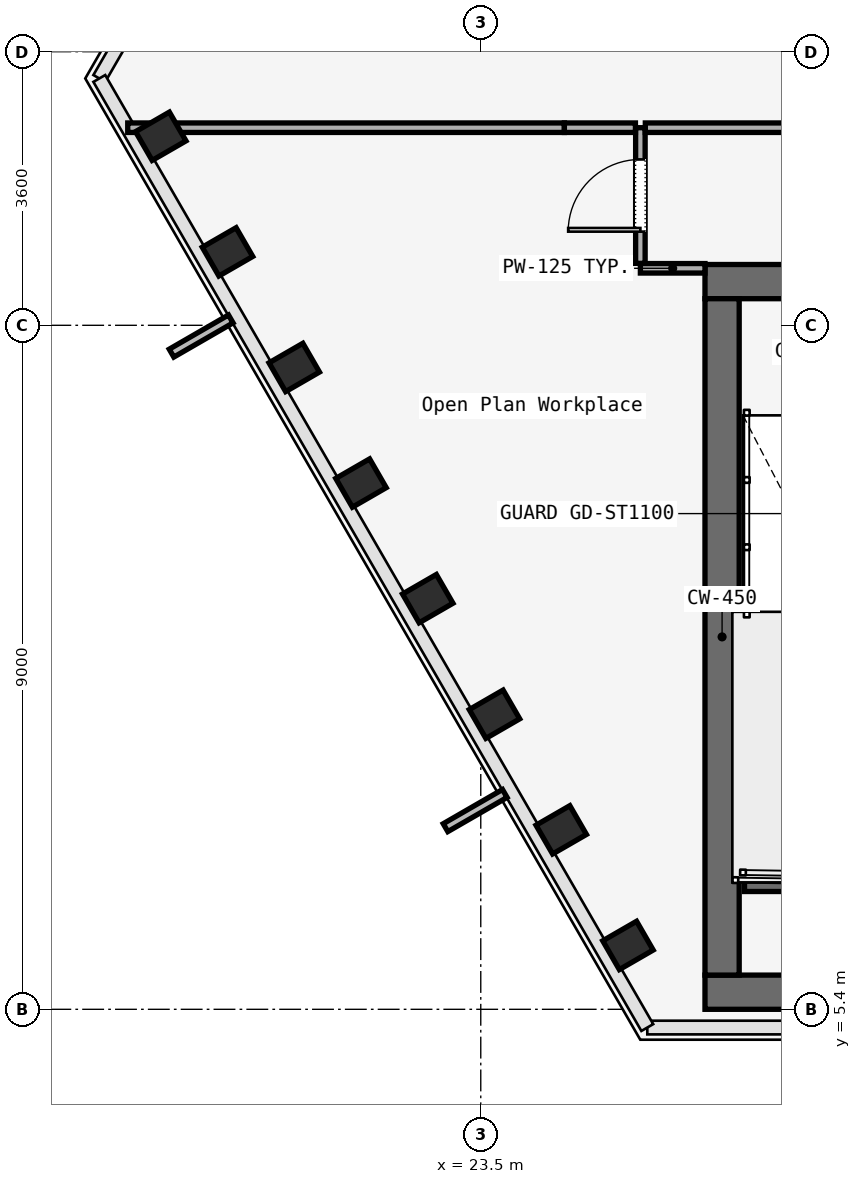
"""IFC4 building model, lengths in metres.
Left out: names, types, materials, properties, quantities, classifications, styles, units other than length and angle.
Written with IfcOpenShell. Run it as: python <this file> out.ifc"""

import sys

from ifc_helpers import new_model, si_unit, direction, frame, frame_2d, origin, origin_2d, place, context, subcontext, project, spatial, rectangle, i_section, extrude, element, fill, save


model = new_model("IFC4")
c1 = context("Model", 3, precision=1e-05, world=origin(), true_north=direction((0.0, 1.0)))
c2 = subcontext(c1, "Body", "Model", "MODEL_VIEW")
j1 = project(units=[si_unit("LENGTHUNIT", "METRE"), si_unit("PLANEANGLEUNIT", "RADIAN")], contexts=[c1])
p1 = place(None, origin())
s1 = spatial("IfcSite", under=j1, at=p1, CompositionType="ELEMENT")
p2 = place(p1, origin())
s2 = spatial("IfcBuilding", under=s1, at=p2, CompositionType="ELEMENT")
p3 = place(p2, frame((0.0, 0.0, 81.6)))
s3 = spatial("IfcBuildingStorey", under=s2, at=p3, CompositionType="ELEMENT", Elevation=81.6)
p4 = place(p3, frame((26.45, 14.975, 0.0), z_axis=(0.0, 0.0, 1.0), x_axis=(1.0, 0.0, 0.0)))
e1 = element("IfcWall", 1, at=p4, inside=s3, PredefinedType="SOLIDWALL", context=c2, shape_type="SweptSolid", body=[
    extrude(rectangle(XDim=31.1, YDim=0.45, at=frame_2d((15.55, 0.0))), origin(), (0.0, 0.0, 1.0), 3.58),
])
p5 = place(p4, frame((1.65, 0.0, 0.0)))
e2 = element("IfcOpeningElement", 2, at=p5, cuts=e1, PredefinedType="OPENING", context=c2, shape_type="SweptSolid", body=[
    extrude(rectangle(XDim=1.1, YDim=2.2, at=frame_2d((0.55, 1.1))), frame((0.0, 0.225, 0.0), z_axis=(0.0, -1.0, 0.0), x_axis=(1.0, 0.0, 0.0)), (0.0, 0.0, 1.0), 0.45),
])
p6 = place(p4, frame((13.65, 0.0, 0.0)))
e3 = element("IfcOpeningElement", 3, at=p6, cuts=e1, PredefinedType="OPENING", context=c2, shape_type="SweptSolid", body=[
    extrude(rectangle(XDim=1.1, YDim=2.2, at=frame_2d((0.55, 1.1))), frame((0.0, 0.225, 0.0), z_axis=(0.0, -1.0, 0.0), x_axis=(1.0, 0.0, 0.0)), (0.0, 0.0, 1.0), 0.45),
])
p7 = place(p4, frame((25.55, 0.0, 0.0)))
e4 = element("IfcOpeningElement", 4, at=p7, cuts=e1, PredefinedType="OPENING", context=c2, shape_type="SweptSolid", body=[
    extrude(rectangle(XDim=1.1, YDim=2.2, at=frame_2d((0.55, 1.1))), frame((0.0, 0.225, 0.0), z_axis=(0.0, -1.0, 0.0), x_axis=(1.0, 0.0, 0.0)), (0.0, 0.0, 1.0), 0.45),
])
p8 = place(p4, frame((10.7, 0.0, 0.0)))
e5 = element("IfcOpeningElement", 5, at=p8, cuts=e1, PredefinedType="OPENING", context=c2, shape_type="SweptSolid", body=[
    extrude(rectangle(XDim=1.4, YDim=2.2, at=frame_2d((0.7, 1.1))), frame((0.0, 0.225, 0.0), z_axis=(0.0, -1.0, 0.0), x_axis=(1.0, 0.0, 0.0)), (0.0, 0.0, 1.0), 0.45),
])
p9 = place(p4, frame((19.35, 0.0, 0.0)))
e6 = element("IfcOpeningElement", 6, at=p9, cuts=e1, PredefinedType="OPENING", context=c2, shape_type="SweptSolid", body=[
    extrude(rectangle(XDim=1.1, YDim=2.2, at=frame_2d((0.55, 1.1))), frame((0.0, 0.225, 0.0), z_axis=(0.0, -1.0, 0.0), x_axis=(1.0, 0.0, 0.0)), (0.0, 0.0, 1.0), 0.45),
])
p10 = place(p4, frame((21.4, 0.0, 0.0)))
e7 = element("IfcOpeningElement", 7, at=p10, cuts=e1, PredefinedType="OPENING", context=c2, shape_type="SweptSolid", body=[
    extrude(rectangle(XDim=0.9, YDim=2.1, at=frame_2d((0.45, 1.05))), frame((0.0, 0.225, 0.0), z_axis=(0.0, -1.0, 0.0), x_axis=(1.0, 0.0, 0.0)), (0.0, 0.0, 1.0), 0.45),
])
p11 = place(p4, frame((23.35, 0.0, 0.0)))
e8 = element("IfcOpeningElement", 8, at=p11, cuts=e1, PredefinedType="OPENING", context=c2, shape_type="SweptSolid", body=[
    extrude(rectangle(XDim=1.3, YDim=2.3, at=frame_2d((0.65, 1.15))), frame((0.0, 0.225, 0.0), z_axis=(0.0, -1.0, 0.0), x_axis=(1.0, 0.0, 0.0)), (0.0, 0.0, 1.0), 0.45),
])
p12 = place(p3, frame((26.45, 5.625, 0.0), z_axis=(0.0, 0.0, 1.0), x_axis=(1.0, 0.0, 0.0)))
e9 = element("IfcWall", 9, at=p12, inside=s3, PredefinedType="SOLIDWALL", context=c2, shape_type="SweptSolid", body=[
    extrude(rectangle(XDim=31.1, YDim=0.45, at=frame_2d((15.55, 0.0))), origin(), (0.0, 0.0, 1.0), 3.58),
])
p13 = place(p3, frame((26.675, 5.85, 0.0), z_axis=(0.0, 0.0, 1.0), x_axis=(0.0, 1.0, 0.0)))
e10 = element("IfcWall", 10, at=p13, inside=s3, PredefinedType="SOLIDWALL", context=c2, shape_type="SweptSolid", body=[
    extrude(rectangle(XDim=8.9, YDim=0.45, at=frame_2d((4.45, 0.0))), origin(), (0.0, 0.0, 1.0), 3.58),
])
for number, where, z_axis, x_axis in (
    (11, (19.29, 16.887, 0.0), (0.0, 0.0, 1.0), (-0.5, 0.866, 0.0)),
    (12, (20.168, 15.366, 0.0), (0.0, 0.0, 1.0), (-0.5, 0.866, 0.0)),
    (13, (21.046, 13.845, 0.0), (0.0, 0.0, 1.0), (-0.5, 0.866, 0.0)),
    (14, (21.924, 12.324, 0.0), (0.0, 0.0, 1.0), (-0.5, 0.866, 0.0)),
    (15, (22.802, 10.803, 0.0), (0.0, 0.0, 1.0), (-0.5, 0.866, 0.0)),
    (16, (23.68, 9.282, 0.0), (0.0, 0.0, 1.0), (-0.5, 0.866, 0.0)),
    (17, (24.559, 7.761, 0.0), (0.0, 0.0, 1.0), (-0.5, 0.866, 0.0)),
    (18, (25.437, 6.24, 0.0), (0.0, 0.0, 1.0), (-0.5, 0.866, 0.0)),
):
    element("IfcColumn", number, at=place(p3, frame(where, z_axis=z_axis, x_axis=x_axis)), inside=s3, PredefinedType="COLUMN", context=c2, shape_type="SweptSolid", body=[
        extrude(i_section(OverallWidth=0.437, OverallDepth=0.514, WebThickness=0.061, FlangeThickness=0.077, FilletRadius=0.015, at=origin_2d()), origin(), (0.0, 0.0, 1.0), 3.58),
    ])
p14 = place(p3, frame((26.97, 7.05, 0.0), z_axis=(0.0, 0.0, 1.0), x_axis=(1.0, 0.0, 0.0)))
e19 = element("IfcWall", 19, at=p14, inside=s3, PredefinedType="SOLIDWALL", context=c2, shape_type="SweptSolid", body=[
    extrude(rectangle(XDim=3.115, YDim=0.2, at=frame_2d((1.558, 0.0))), origin(), (0.0, 0.0, 1.0), 3.8),
])
p15 = place(p3, frame((26.45, 15.15, 0.0), z_axis=(0.0, 0.0, 1.0), x_axis=(-1.0, 0.0, 0.0)))
e20 = element("IfcWall", 20, at=p15, inside=s3, PredefinedType="PARTITIONING", context=c2, shape_type="SweptSolid", body=[
    extrude(rectangle(XDim=0.85, YDim=0.125, at=frame_2d((0.425, 0.0))), origin(), (0.0, 0.0, 1.0), 2.95),
])
p16 = place(p3, frame((25.6, 15.215, 0.0), z_axis=(0.0, 0.0, 1.0), x_axis=(0.0, 1.0, 0.0)))
e21 = element("IfcWall", 21, at=p16, inside=s3, PredefinedType="PARTITIONING", context=c2, shape_type="SweptSolid", body=[
    extrude(rectangle(XDim=1.785, YDim=0.125, at=frame_2d((0.893, 0.0))), origin(), (0.0, 0.0, 1.0), 2.95),
])
p17 = place(p16, frame((0.417, 0.0, 0.0)))
e22 = element("IfcOpeningElement", 22, at=p17, cuts=e21, PredefinedType="OPENING", context=c2, shape_type="SweptSolid", body=[
    extrude(rectangle(XDim=0.95, YDim=2.2, at=frame_2d((0.475, 1.1))), frame((0.0, 0.062, 0.0), z_axis=(0.0, -1.0, 0.0), x_axis=(1.0, 0.0, 0.0)), (0.0, 0.0, 1.0), 0.125),
])
p18 = place(p3, frame((25.665, 17.0, 0.0), z_axis=(0.0, 0.0, 1.0), x_axis=(1.0, 0.0, 0.0)))
e23 = element("IfcWall", 23, at=p18, inside=s3, PredefinedType="PARTITIONING", context=c2, shape_type="SweptSolid", body=[
    extrude(rectangle(XDim=4.135, YDim=0.125, at=frame_2d((2.067, 0.0))), origin(), (0.0, 0.0, 1.0), 2.95),
])
p19 = place(p3, frame((18.855, 17.0, 0.0), z_axis=(0.0, 0.0, 1.0), x_axis=(1.0, 0.0, 0.0)))
e24 = element("IfcWall", 24, at=p19, inside=s3, PredefinedType="PARTITIONING", context=c2, shape_type="SweptSolid", body=[
    extrude(rectangle(XDim=5.745, YDim=0.125, at=frame_2d((2.873, 0.0))), origin(), (0.0, 0.0, 1.0), 2.95),
])
p20 = place(p3, frame((24.6, 17.0, 0.0), z_axis=(0.0, 0.0, 1.0), x_axis=(1.0, 0.0, 0.0)))
e25 = element("IfcWall", 25, at=p20, inside=s3, PredefinedType="PARTITIONING", context=c2, shape_type="SweptSolid", body=[
    extrude(rectangle(XDim=0.935, YDim=0.125, at=frame_2d((0.467, 0.0))), origin(), (0.0, 0.0, 1.0), 2.95),
])
p21 = place(p17, origin())
e26 = element("IfcDoor", 26, at=p21, inside=s3, OperationType="SINGLE_SWING_LEFT", PredefinedType="DOOR", context=c2, shape_type="SweptSolid", body=[
    extrude(rectangle(XDim=0.95, YDim=2.2, at=frame_2d((0.475, 1.1))), frame((0.0, 0.025, 0.0), z_axis=(0.0, -1.0, 0.0), x_axis=(1.0, 0.0, 0.0)), (0.0, 0.0, 1.0), 0.05),
])
fill(e22, e26)
save(model, sys.argv[1])
